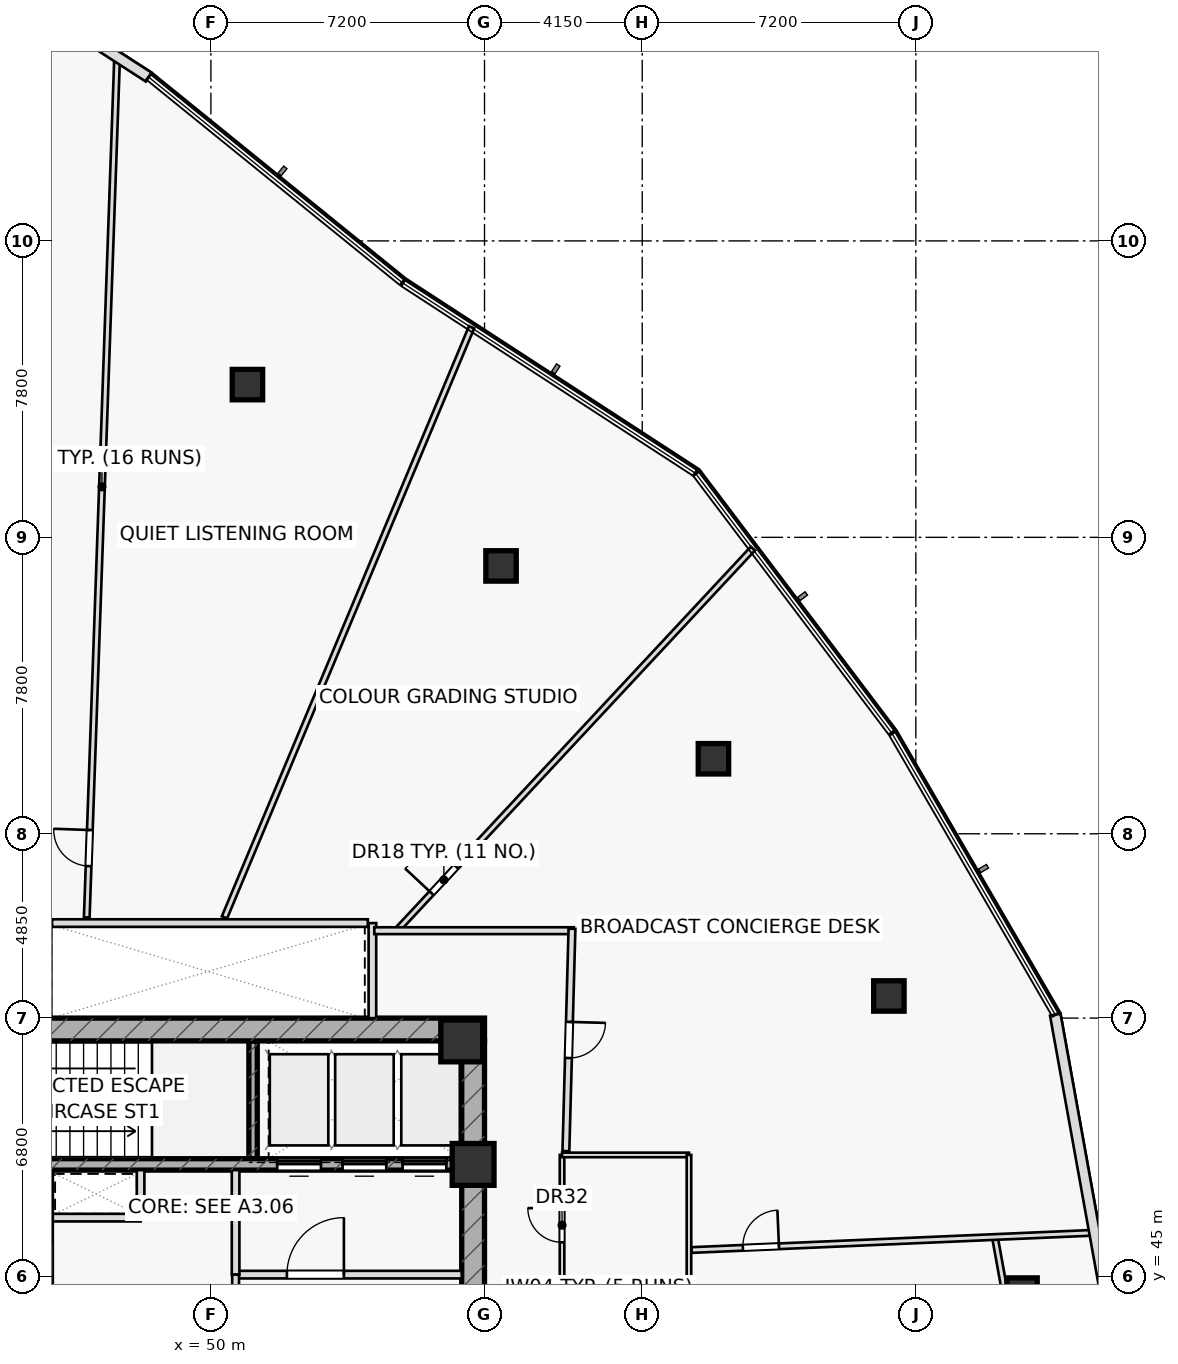
"""IFC4 building model, lengths in metres.
Left out: names, types, materials, properties, quantities, classifications, styles, units other than length and angle.
Written with IfcOpenShell. Run it as: python <this file> out.ifc"""

import sys

from ifc_helpers import new_model, si_unit, direction, frame, frame_2d, origin, origin_2d, place, context, subcontext, project, spatial, rectangle, hollow_rectangle, extrude, element, fill, save


model = new_model("IFC4")
c1 = context("Model", 3, precision=1e-05, world=origin(), true_north=direction((0.0, 1.0)))
c2 = subcontext(c1, "Body", "Model", "MODEL_VIEW")
j1 = project(units=[si_unit("LENGTHUNIT", "METRE"), si_unit("PLANEANGLEUNIT", "RADIAN")], contexts=[c1])
p1 = place(None, origin())
s1 = spatial("IfcSite", under=j1, at=p1, CompositionType="ELEMENT")
p2 = place(p1, origin())
s2 = spatial("IfcBuilding", under=s1, at=p2, CompositionType="ELEMENT")
p3 = place(p2, frame((0.0, 0.0, 39.3)))
s3 = spatial("IfcBuildingStorey", under=s2, at=p3, CompositionType="ELEMENT", Elevation=39.3)
p4 = place(p3, frame((51.11, 48.1, 0.0), z_axis=(0.0, 0.0, 1.0), x_axis=(0.0, 1.0, 0.0)))
e1 = element("IfcWall", 1, at=p4, inside=s3, PredefinedType="SHEAR", context=c2, shape_type="SweptSolid", body=[
    extrude(rectangle(XDim=3.1, YDim=0.22, at=frame_2d((1.55, 0.0))), origin(), (0.0, 0.0, 1.0), 3.6),
])
p5 = place(p3, frame((42.8, 51.5, 0.0), z_axis=(0.0, 0.0, 1.0), x_axis=(1.0, 0.0, 0.0)))
e2 = element("IfcWall", 2, at=p5, inside=s3, PredefinedType="SHEAR", context=c2, shape_type="SweptSolid", body=[
    extrude(rectangle(XDim=14.4, YDim=0.6, at=frame_2d((7.2, 0.0))), origin(), (0.0, 0.0, 1.0), 3.6),
])
p6 = place(p5, frame((0.88, 0.0, 0.0)))
e3 = element("IfcOpeningElement", 3, at=p6, cuts=e2, PredefinedType="OPENING", context=c2, shape_type="SweptSolid", body=[
    extrude(rectangle(XDim=1.05, YDim=2.2, at=frame_2d((0.525, 1.1))), frame((0.0, 0.31, 0.0), z_axis=(0.0, -1.0, 0.0), x_axis=(1.0, 0.0, 0.0)), (0.0, 0.0, 1.0), 0.62),
])
p7 = place(p3, frame((56.9, 38.8, 0.0), z_axis=(0.0, 0.0, 1.0), x_axis=(0.0, 1.0, 0.0)))
e4 = element("IfcWall", 4, at=p7, inside=s3, PredefinedType="SHEAR", context=c2, shape_type="SweptSolid", body=[
    extrude(rectangle(XDim=12.4, YDim=0.6, at=frame_2d((6.2, 0.0))), origin(), (0.0, 0.0, 1.0), 3.6),
])
p8 = place(p7, frame((3.85, 0.0, 0.0)))
e5 = element("IfcOpeningElement", 5, at=p8, cuts=e4, PredefinedType="OPENING", context=c2, shape_type="SweptSolid", body=[
    extrude(rectangle(XDim=1.5, YDim=2.2, at=frame_2d((0.75, 1.1))), frame((0.0, 0.31, 0.0), z_axis=(0.0, -1.0, 0.0), x_axis=(1.0, 0.0, 0.0)), (0.0, 0.0, 1.0), 0.62),
])
p9 = place(p3, frame((43.4, 47.95, 0.0), z_axis=(0.0, 0.0, 1.0), x_axis=(1.0, 0.0, 0.0)))
e6 = element("IfcWall", 6, at=p9, inside=s3, PredefinedType="SHEAR", context=c2, shape_type="SweptSolid", body=[
    extrude(rectangle(XDim=13.2, YDim=0.3, at=frame_2d((6.6, 0.0))), origin(), (0.0, 0.0, 1.0), 3.6),
])
p10 = place(p9, frame((8.345, 0.0, 0.0)))
e7 = element("IfcOpeningElement", 7, at=p10, cuts=e6, PredefinedType="OPENING", context=c2, shape_type="SweptSolid", body=[
    extrude(rectangle(XDim=1.15, YDim=2.2, at=frame_2d((0.575, 1.1))), frame((0.0, 0.16, 0.0), z_axis=(0.0, -1.0, 0.0), x_axis=(1.0, 0.0, 0.0)), (0.0, 0.0, 1.0), 0.32),
])
p11 = place(p9, frame((10.065, 0.0, 0.0)))
e8 = element("IfcOpeningElement", 8, at=p11, cuts=e6, PredefinedType="OPENING", context=c2, shape_type="SweptSolid", body=[
    extrude(rectangle(XDim=1.15, YDim=2.2, at=frame_2d((0.575, 1.1))), frame((0.0, 0.16, 0.0), z_axis=(0.0, -1.0, 0.0), x_axis=(1.0, 0.0, 0.0)), (0.0, 0.0, 1.0), 0.32),
])
p12 = place(p9, frame((11.645, 0.0, 0.0)))
e9 = element("IfcOpeningElement", 9, at=p12, cuts=e6, PredefinedType="OPENING", context=c2, shape_type="SweptSolid", body=[
    extrude(rectangle(XDim=1.15, YDim=2.2, at=frame_2d((0.575, 1.1))), frame((0.0, 0.16, 0.0), z_axis=(0.0, -1.0, 0.0), x_axis=(1.0, 0.0, 0.0)), (0.0, 0.0, 1.0), 0.32),
])
for number, where, z_axis, x_axis in (
    (10, (56.9, 47.95, 0.0), (0.0, 0.0, 1.0), (1.0, 0.0, 0.0)),
    (11, (56.6, 51.2, 0.0), (0.0, 0.0, 1.0), (1.0, 0.0, 0.0)),
):
    element("IfcColumn", number, at=place(p3, frame(where, z_axis=z_axis, x_axis=x_axis)), inside=s3, PredefinedType="COLUMN", context=c2, shape_type="SweptSolid", body=[
        extrude(rectangle(XDim=1.1, YDim=1.1, at=origin_2d()), origin(), (0.0, 0.0, 1.0), 3.6),
    ])
for number, where, z_axis, x_axis in (
    (12, (71.344, 44.565, 0.0), (0.0, 0.0, 1.0), (1.0, 0.0, 0.0)),
    (13, (67.841, 52.383, 0.0), (0.0, 0.0, 1.0), (1.0, 0.0, 0.0)),
    (14, (63.224, 58.624, 0.0), (0.0, 0.0, 1.0), (1.0, 0.0, 0.0)),
    (15, (57.635, 63.698, 0.0), (0.0, 0.0, 1.0), (1.0, 0.0, 0.0)),
    (16, (50.962, 68.469, 0.0), (0.0, 0.0, 1.0), (1.0, 0.0, 0.0)),
):
    element("IfcColumn", number, at=place(p3, frame(where, z_axis=z_axis, x_axis=x_axis)), inside=s3, PredefinedType="COLUMN", context=c2, shape_type="SweptSolid", body=[
        extrude(hollow_rectangle(XDim=0.8, YDim=0.8, WallThickness=0.045, at=origin_2d()), origin(), (0.0, 0.0, 1.0), 3.6),
    ])
p13 = place(p3, frame((54.25, 51.8, 0.0), z_axis=(0.0, 0.0, 1.0), x_axis=(0.0, 1.0, 0.0)))
e17 = element("IfcWall", 17, at=p13, inside=s3, PredefinedType="PARTITIONING", context=c2, shape_type="SweptSolid", body=[
    extrude(rectangle(XDim=2.5, YDim=0.2, at=frame_2d((1.25, 0.0))), origin(), (0.0, 0.0, 1.0), 3.6),
])
p14 = place(p3, frame((45.75, 46.55, 0.0), z_axis=(0.0, 0.0, 1.0), x_axis=(1.0, 0.0, 0.0)))
e18 = element("IfcWall", 18, at=p14, inside=s3, PredefinedType="PARTITIONING", context=c2, shape_type="SweptSolid", body=[
    extrude(rectangle(XDim=2.4, YDim=0.2, at=frame_2d((1.2, 0.0))), origin(), (0.0, 0.0, 1.0), 3.6),
])
p15 = place(p3, frame((48.15, 46.55, 0.0), z_axis=(0.0, 0.0, 1.0), x_axis=(0.0, 1.0, 0.0)))
e19 = element("IfcWall", 19, at=p15, inside=s3, PredefinedType="PARTITIONING", context=c2, shape_type="SweptSolid", body=[
    extrude(rectangle(XDim=1.25, YDim=0.2, at=frame_2d((0.625, 0.0))), origin(), (0.0, 0.0, 1.0), 3.6),
])
p16 = place(p3, frame((50.65, 45.05, 0.0), z_axis=(0.0, 0.0, 1.0), x_axis=(1.0, 0.0, 0.0)))
e20 = element("IfcWall", 20, at=p16, inside=s3, PredefinedType="PARTITIONING", context=c2, shape_type="SweptSolid", body=[
    extrude(rectangle(XDim=5.95, YDim=0.2, at=frame_2d((2.975, 0.0))), origin(), (0.0, 0.0, 1.0), 3.6),
])
p17 = place(p16, frame((1.35, 0.0, 0.0)))
e21 = element("IfcOpeningElement", 21, at=p17, cuts=e20, PredefinedType="OPENING", context=c2, shape_type="SweptSolid", body=[
    extrude(rectangle(XDim=1.5, YDim=2.2, at=frame_2d((0.75, 1.1))), frame((0.0, 0.11, 0.0), z_axis=(0.0, -1.0, 0.0), x_axis=(1.0, 0.0, 0.0)), (0.0, 0.0, 1.0), 0.22),
])
p18 = place(p3, frame((50.65, 45.05, 0.0), z_axis=(0.0, 0.0, 1.0), x_axis=(0.0, 1.0, 0.0)))
e22 = element("IfcWall", 22, at=p18, inside=s3, PredefinedType="PARTITIONING", context=c2, shape_type="SweptSolid", body=[
    extrude(rectangle(XDim=2.75, YDim=0.2, at=frame_2d((1.375, 0.0))), origin(), (0.0, 0.0, 1.0), 3.6),
])
p19 = place(p3, frame((50.65, 42.2, 0.0), z_axis=(0.0, 0.0, 1.0), x_axis=(0.0, 1.0, 0.0)))
e23 = element("IfcWall", 23, at=p19, inside=s3, PredefinedType="PARTITIONING", context=c2, shape_type="SweptSolid", body=[
    extrude(rectangle(XDim=2.85, YDim=0.18, at=frame_2d((1.425, 0.0))), origin(), (0.0, 0.0, 1.0), 3.6),
])
p20 = place(p19, frame((0.45, 0.0, 0.0)))
e24 = element("IfcOpeningElement", 24, at=p20, cuts=e23, PredefinedType="OPENING", context=c2, shape_type="SweptSolid", body=[
    extrude(rectangle(XDim=1.5, YDim=2.2, at=frame_2d((0.75, 1.1))), frame((0.0, 0.1, 0.0), z_axis=(0.0, -1.0, 0.0), x_axis=(1.0, 0.0, 0.0)), (0.0, 0.0, 1.0), 0.2),
])
p21 = place(p3, frame((45.75, 42.2, 0.0), z_axis=(0.0, 0.0, 1.0), x_axis=(0.0, 1.0, 0.0)))
e25 = element("IfcWall", 25, at=p21, inside=s3, PredefinedType="PARTITIONING", context=c2, shape_type="SweptSolid", body=[
    extrude(rectangle(XDim=5.6, YDim=0.18, at=frame_2d((2.8, 0.0))), origin(), (0.0, 0.0, 1.0), 3.6),
])
p22 = place(p21, frame((0.42, 0.0, 0.0)))
e26 = element("IfcOpeningElement", 26, at=p22, cuts=e25, PredefinedType="OPENING", context=c2, shape_type="SweptSolid", body=[
    extrude(rectangle(XDim=0.85, YDim=2.05, at=frame_2d((0.425, 1.025))), frame((0.0, 0.1, 0.0), z_axis=(0.0, -1.0, 0.0), x_axis=(1.0, 0.0, 0.0)), (0.0, 0.0, 1.0), 0.2),
])
p23 = place(p21, frame((1.57, 0.0, 0.0)))
e27 = element("IfcOpeningElement", 27, at=p23, cuts=e25, PredefinedType="OPENING", context=c2, shape_type="SweptSolid", body=[
    extrude(rectangle(XDim=0.85, YDim=2.05, at=frame_2d((0.425, 1.025))), frame((0.0, 0.1, 0.0), z_axis=(0.0, -1.0, 0.0), x_axis=(1.0, 0.0, 0.0)), (0.0, 0.0, 1.0), 0.2),
])
p24 = place(p21, frame((2.8, 0.0, 0.0)))
e28 = element("IfcOpeningElement", 28, at=p24, cuts=e25, PredefinedType="OPENING", context=c2, shape_type="SweptSolid", body=[
    extrude(rectangle(XDim=0.9, YDim=2.05, at=frame_2d((0.45, 1.025))), frame((0.0, 0.1, 0.0), z_axis=(0.0, -1.0, 0.0), x_axis=(1.0, 0.0, 0.0)), (0.0, 0.0, 1.0), 0.2),
])
p25 = place(p3, frame((72.969, 33.091, 0.0), z_axis=(0.0, 0.0, 1.0), x_axis=(-0.177742578179, 0.984077017261, 0.0)))
e29 = element("IfcWall", 29, at=p25, inside=s3, PredefinedType="PARTITIONING", context=c2, shape_type="SweptSolid", body=[
    extrude(rectangle(XDim=13.179, YDim=0.15, at=frame_2d((6.59, 0.0))), origin(), (0.0, 0.0, 1.0), 2.925),
])
p26 = place(p3, frame((59.24, 41.2, 0.0), z_axis=(0.0, 0.0, 1.0), x_axis=(0.0, 1.0, 0.0)))
e30 = element("IfcWall", 30, at=p26, inside=s3, PredefinedType="PARTITIONING", context=c2, shape_type="SweptSolid", body=[
    extrude(rectangle(XDim=7.0, YDim=0.12, at=frame_2d((3.5, 0.0))), origin(), (0.0, 0.0, 1.0), 3.6),
])
p27 = place(p26, frame((1.15, 0.0, 0.0)))
e31 = element("IfcOpeningElement", 31, at=p27, cuts=e30, PredefinedType="OPENING", context=c2, shape_type="SweptSolid", body=[
    extrude(rectangle(XDim=0.9, YDim=2.05, at=frame_2d((0.45, 1.025))), frame((0.0, 0.07, 0.0), z_axis=(0.0, -1.0, 0.0), x_axis=(1.0, 0.0, 0.0)), (0.0, 0.0, 1.0), 0.14),
])
p28 = place(p26, frame((4.7, 0.0, 0.0)))
e32 = element("IfcOpeningElement", 32, at=p28, cuts=e30, PredefinedType="OPENING", context=c2, shape_type="SweptSolid", body=[
    extrude(rectangle(XDim=0.9, YDim=2.05, at=frame_2d((0.45, 1.025))), frame((0.0, 0.07, 0.0), z_axis=(0.0, -1.0, 0.0), x_axis=(1.0, 0.0, 0.0)), (0.0, 0.0, 1.0), 0.14),
])
p29 = place(p3, frame((59.24, 48.2, 0.0), z_axis=(0.0, 0.0, 1.0), x_axis=(1.0, 0.0, 0.0)))
e33 = element("IfcWall", 33, at=p29, inside=s3, PredefinedType="PARTITIONING", context=c2, shape_type="SweptSolid", body=[
    extrude(rectangle(XDim=3.34, YDim=0.12, at=frame_2d((1.67, 0.0))), origin(), (0.0, 0.0, 1.0), 3.6),
])
p30 = place(p3, frame((62.58, 41.2, 0.0), z_axis=(0.0, 0.0, 1.0), x_axis=(0.0, 1.0, 0.0)))
e34 = element("IfcWall", 34, at=p30, inside=s3, PredefinedType="PARTITIONING", context=c2, shape_type="SweptSolid", body=[
    extrude(rectangle(XDim=7.0, YDim=0.12, at=frame_2d((3.5, 0.0))), origin(), (0.0, 0.0, 1.0), 3.6),
])
p31 = place(p3, frame((54.886, 54.1, 0.0), z_axis=(0.0, 0.0, 1.0), x_axis=(0.682000556226, 0.731351653657, 0.0)))
e35 = element("IfcWall", 35, at=p31, inside=s3, PredefinedType="PARTITIONING", context=c2, shape_type="SweptSolid", body=[
    extrude(rectangle(XDim=13.748, YDim=0.15, at=frame_2d((6.874, 0.0))), origin(), (0.0, 0.0, 1.0), 2.925),
])
p32 = place(p31, frame((1.35, 0.0, 0.0)))
e36 = element("IfcOpeningElement", 36, at=p32, cuts=e35, PredefinedType="OPENING", context=c2, shape_type="SweptSolid", body=[
    extrude(rectangle(XDim=0.95, YDim=2.05, at=frame_2d((0.475, 1.025))), frame((0.0, 0.085, 0.0), z_axis=(0.0, -1.0, 0.0), x_axis=(1.0, 0.0, 0.0)), (0.0, 0.0, 1.0), 0.17),
])
p33 = place(p3, frame((50.357, 54.45, 0.0), z_axis=(0.0, 0.0, 1.0), x_axis=(0.386251161363, 0.922393647173, 0.0)))
e37 = element("IfcWall", 37, at=p33, inside=s3, PredefinedType="PARTITIONING", context=c2, shape_type="SweptSolid", body=[
    extrude(rectangle(XDim=16.833, YDim=0.15, at=frame_2d((8.417, 0.0))), origin(), (0.0, 0.0, 1.0), 2.925),
])
p34 = place(p3, frame((46.733, 54.45, 0.0), z_axis=(0.0, 0.0, 1.0), x_axis=(0.035277469933, 0.99937755634, 0.0)))
e38 = element("IfcWall", 38, at=p34, inside=s3, PredefinedType="PARTITIONING", context=c2, shape_type="SweptSolid", body=[
    extrude(rectangle(XDim=22.672, YDim=0.15, at=frame_2d((11.336, 0.0))), origin(), (0.0, 0.0, 1.0), 2.975),
])
p35 = place(p34, frame((1.35, 0.0, 0.0)))
e39 = element("IfcOpeningElement", 39, at=p35, cuts=e38, PredefinedType="OPENING", context=c2, shape_type="SweptSolid", body=[
    extrude(rectangle(XDim=0.95, YDim=2.05, at=frame_2d((0.475, 1.025))), frame((0.0, 0.085, 0.0), z_axis=(0.0, -1.0, 0.0), x_axis=(1.0, 0.0, 0.0)), (0.0, 0.0, 1.0), 0.17),
])
p36 = place(p3, frame((62.65, 45.698, 0.0), z_axis=(0.0, 0.0, 1.0), x_axis=(0.999079170403, 0.042904676507, 0.0)))
e40 = element("IfcWall", 40, at=p36, inside=s3, PredefinedType="PARTITIONING", context=c2, shape_type="SweptSolid", body=[
    extrude(rectangle(XDim=10.624, YDim=0.15, at=frame_2d((5.312, 0.0))), origin(), (0.0, 0.0, 1.0), 2.975),
])
p37 = place(p36, frame((1.35, 0.0, 0.0)))
e41 = element("IfcOpeningElement", 41, at=p37, cuts=e40, PredefinedType="OPENING", context=c2, shape_type="SweptSolid", body=[
    extrude(rectangle(XDim=0.95, YDim=2.05, at=frame_2d((0.475, 1.025))), frame((0.0, 0.085, 0.0), z_axis=(0.0, -1.0, 0.0), x_axis=(1.0, 0.0, 0.0)), (0.0, 0.0, 1.0), 0.17),
])
p38 = place(p3, frame((54.3, 54.1, 0.0), z_axis=(0.0, 0.0, 1.0), x_axis=(1.0, 0.0, 0.0)))
e42 = element("IfcWall", 42, at=p38, inside=s3, PredefinedType="PARTITIONING", context=c2, shape_type="SweptSolid", body=[
    extrude(rectangle(XDim=5.25, YDim=0.18, at=frame_2d((2.625, 0.0))), origin(), (0.0, 0.0, 1.0), 2.925),
])
p39 = place(p3, frame((59.501, 54.15, 0.0), z_axis=(0.0, 0.0, 1.0), x_axis=(-0.027367567602, -0.999625437973, 0.0)))
e43 = element("IfcWall", 43, at=p39, inside=s3, PredefinedType="PARTITIONING", context=c2, shape_type="SweptSolid", body=[
    extrude(rectangle(XDim=5.852, YDim=0.18, at=frame_2d((2.926, 0.0))), origin(), (0.0, 0.0, 1.0), 2.925),
])
p40 = place(p39, frame((2.451, 0.0, 0.0)))
e44 = element("IfcOpeningElement", 44, at=p40, cuts=e43, PredefinedType="OPENING", context=c2, shape_type="SweptSolid", body=[
    extrude(rectangle(XDim=0.95, YDim=2.05, at=frame_2d((0.475, 1.025))), frame((0.0, 0.1, 0.0), z_axis=(0.0, -1.0, 0.0), x_axis=(1.0, 0.0, 0.0)), (0.0, 0.0, 1.0), 0.2),
])
p41 = place(p3, frame((48.363, 76.56, 0.0), z_axis=(0.0, 0.0, 1.0), x_axis=(-0.840072472412, 0.542474184727, 0.0)))
e45 = element("IfcWall", 45, at=p41, inside=s3, PredefinedType="STANDARD", context=c2, shape_type="SweptSolid", body=[
    extrude(rectangle(XDim=2.241, YDim=0.28, at=frame_2d((1.121, 0.0))), origin(), (0.0, 0.0, 1.0), 3.6),
])
p42 = place(p3, frame((73.855, 42.82, 0.0), z_axis=(0.0, 0.0, 1.0), x_axis=(-0.177493704395, 0.984121935992, 0.0)))
e46 = element("IfcWall", 46, at=p42, inside=s3, PredefinedType="STANDARD", context=c2, shape_type="SweptSolid", body=[
    extrude(rectangle(XDim=9.217, YDim=0.28, at=frame_2d((4.608, 0.0))), origin(), (0.0, 0.0, 1.0), 3.6),
])
p43 = place(p3, frame((45.82, 54.3, 0.0), z_axis=(0.0, 0.0, 1.0), x_axis=(1.0, 0.0, 0.0)))
e47 = element("IfcWall", 47, at=p43, inside=s3, PredefinedType="PARTITIONING", context=c2, shape_type="SweptSolid", body=[
    extrude(rectangle(XDim=8.31, YDim=0.2, at=frame_2d((4.155, 0.0))), origin(), (0.0, 0.0, 1.0), 3.6),
])
p44 = place(p17, origin())
e48 = element("IfcDoor", 48, at=p44, inside=s3, OperationType="SINGLE_SWING_RIGHT", PredefinedType="DOOR", context=c2, shape_type="SweptSolid", body=[
    extrude(rectangle(XDim=1.5, YDim=2.2, at=frame_2d((0.75, 1.1))), frame((0.0, 0.025, 0.0), z_axis=(0.0, -1.0, 0.0), x_axis=(1.0, 0.0, 0.0)), (0.0, 0.0, 1.0), 0.05),
])
fill(e21, e48)
p45 = place(p28, origin())
e49 = element("IfcDoor", 49, at=p45, inside=s3, OperationType="SINGLE_SWING_RIGHT", PredefinedType="DOOR", context=c2, shape_type="SweptSolid", body=[
    extrude(rectangle(XDim=0.9, YDim=2.05, at=frame_2d((0.45, 1.025))), frame((0.0, 0.025, 0.0), z_axis=(0.0, -1.0, 0.0), x_axis=(1.0, 0.0, 0.0)), (0.0, 0.0, 1.0), 0.05),
])
fill(e32, e49)
p46 = place(p32, origin())
e50 = element("IfcDoor", 50, at=p46, inside=s3, OperationType="SINGLE_SWING_LEFT", PredefinedType="DOOR", context=c2, shape_type="SweptSolid", body=[
    extrude(rectangle(XDim=0.95, YDim=2.05, at=frame_2d((0.475, 1.025))), frame((0.0, 0.025, 0.0), z_axis=(0.0, -1.0, 0.0), x_axis=(1.0, 0.0, 0.0)), (0.0, 0.0, 1.0), 0.05),
])
fill(e36, e50)
p47 = place(p35, origin())
e51 = element("IfcDoor", 51, at=p47, inside=s3, OperationType="SINGLE_SWING_RIGHT", PredefinedType="DOOR", context=c2, shape_type="SweptSolid", body=[
    extrude(rectangle(XDim=0.95, YDim=2.05, at=frame_2d((0.475, 1.025))), frame((0.0, 0.025, 0.0), z_axis=(0.0, -1.0, 0.0), x_axis=(1.0, 0.0, 0.0)), (0.0, 0.0, 1.0), 0.05),
])
fill(e39, e51)
p48 = place(p37, origin())
e52 = element("IfcDoor", 52, at=p48, inside=s3, OperationType="SINGLE_SWING_RIGHT", PredefinedType="DOOR", context=c2, shape_type="SweptSolid", body=[
    extrude(rectangle(XDim=0.95, YDim=2.05, at=frame_2d((0.475, 1.025))), frame((0.0, 0.025, 0.0), z_axis=(0.0, -1.0, 0.0), x_axis=(1.0, 0.0, 0.0)), (0.0, 0.0, 1.0), 0.05),
])
fill(e41, e52)
p49 = place(p40, origin())
e53 = element("IfcDoor", 53, at=p49, inside=s3, OperationType="SINGLE_SWING_LEFT", PredefinedType="DOOR", context=c2, shape_type="SweptSolid", body=[
    extrude(rectangle(XDim=0.95, YDim=2.05, at=frame_2d((0.475, 1.025))), frame((0.0, 0.025, 0.0), z_axis=(0.0, -1.0, 0.0), x_axis=(1.0, 0.0, 0.0)), (0.0, 0.0, 1.0), 0.05),
])
fill(e44, e53)
p50 = place(p10, origin())
e54 = element("IfcDoor", 54, at=p50, inside=s3, OperationType="SLIDING_TO_LEFT", PredefinedType="DOOR", context=c2, shape_type="SweptSolid", body=[
    extrude(rectangle(XDim=1.15, YDim=2.2, at=frame_2d((0.575, 1.1))), frame((0.0, 0.025, 0.0), z_axis=(0.0, -1.0, 0.0), x_axis=(1.0, 0.0, 0.0)), (0.0, 0.0, 1.0), 0.05),
])
fill(e7, e54)
p51 = place(p11, origin())
e55 = element("IfcDoor", 55, at=p51, inside=s3, OperationType="SLIDING_TO_LEFT", PredefinedType="DOOR", context=c2, shape_type="SweptSolid", body=[
    extrude(rectangle(XDim=1.15, YDim=2.2, at=frame_2d((0.575, 1.1))), frame((0.0, 0.025, 0.0), z_axis=(0.0, -1.0, 0.0), x_axis=(1.0, 0.0, 0.0)), (0.0, 0.0, 1.0), 0.05),
])
fill(e8, e55)
p52 = place(p12, origin())
e56 = element("IfcDoor", 56, at=p52, inside=s3, OperationType="SLIDING_TO_LEFT", PredefinedType="DOOR", context=c2, shape_type="SweptSolid", body=[
    extrude(rectangle(XDim=1.15, YDim=2.2, at=frame_2d((0.575, 1.1))), frame((0.0, 0.025, 0.0), z_axis=(0.0, -1.0, 0.0), x_axis=(1.0, 0.0, 0.0)), (0.0, 0.0, 1.0), 0.05),
])
fill(e9, e56)
save(model, sys.argv[1])
